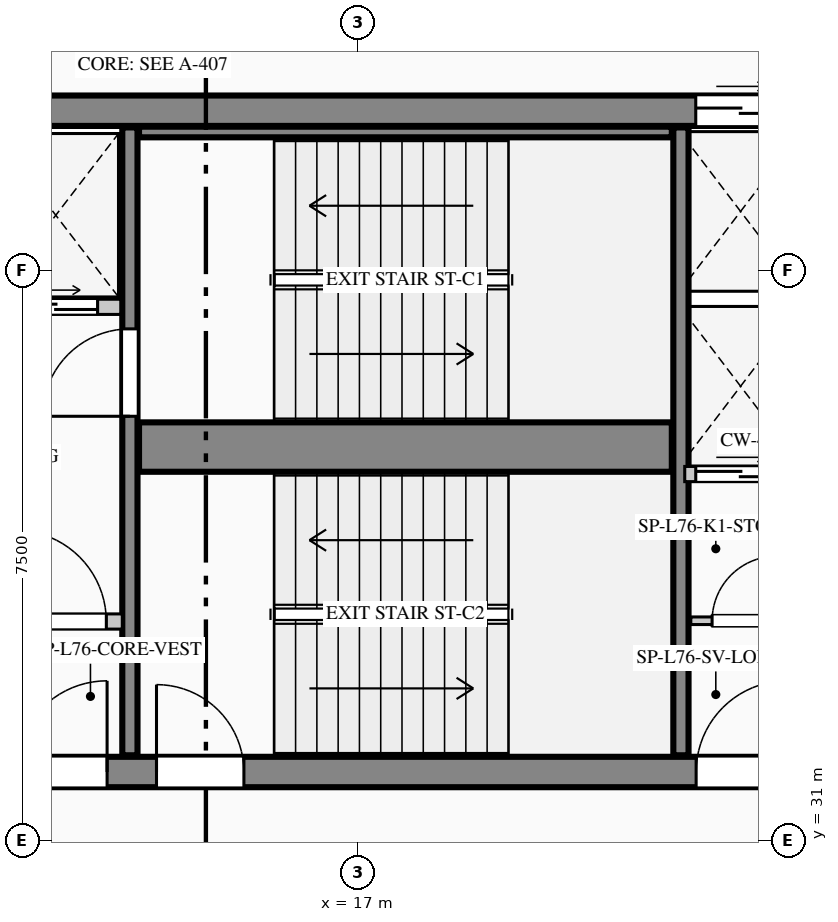
"""IFC4 building model, lengths in metres.
Left out: names, types, materials, properties, quantities, classifications, styles, units other than length and angle.
Written with IfcOpenShell. Run it as: python <this file> out.ifc"""

import sys

from ifc_helpers import new_model, si_unit, direction, frame, frame_2d, origin, place, context, subcontext, project, spatial, rectangle, extrude, element, fill, save


model = new_model("IFC4")
c1 = context("Model", 3, precision=1e-05, world=origin(), true_north=direction((0.0, 1.0)))
c2 = subcontext(c1, "Body", "Model", "MODEL_VIEW")
j1 = project(units=[si_unit("LENGTHUNIT", "METRE"), si_unit("PLANEANGLEUNIT", "RADIAN")], contexts=[c1])
p1 = place(None, origin())
s1 = spatial("IfcSite", under=j1, at=p1, CompositionType="ELEMENT")
p2 = place(p1, origin())
s2 = spatial("IfcBuilding", under=s1, at=p2, CompositionType="ELEMENT")
p3 = place(p2, frame((0.0, 0.0, 315.95)))
s3 = spatial("IfcBuildingStorey", under=s2, at=p3, CompositionType="ELEMENT", Elevation=315.95)
p4 = place(p3, frame((5.6, 40.6, 0.0), z_axis=(0.0, 0.0, 1.0), x_axis=(1.0, 0.0, 0.0)))
e1 = element("IfcWall", 1, at=p4, inside=s3, PredefinedType="SHEAR", context=c2, shape_type="SweptSolid", body=[
    extrude(rectangle(XDim=17.65, YDim=0.4, at=frame_2d((8.825, 0.0))), origin(), (0.0, 0.0, 1.0), 3.95),
])
p5 = place(p4, frame((15.845, 0.0, 0.0)))
e2 = element("IfcOpeningElement", 2, at=p5, cuts=e1, PredefinedType="OPENING", context=c2, shape_type="SweptSolid", body=[
    extrude(rectangle(XDim=1.18, YDim=2.25, at=frame_2d((0.59, 1.125))), frame((0.0, 0.21, 0.0), z_axis=(0.0, -1.0, 0.0), x_axis=(1.0, 0.0, 0.0)), (0.0, 0.0, 1.0), 0.42),
])
p6 = place(p3, frame((5.6, 31.9, 0.0), z_axis=(0.0, 0.0, 1.0), x_axis=(1.0, 0.0, 0.0)))
e3 = element("IfcWall", 3, at=p6, inside=s3, PredefinedType="SHEAR", context=c2, shape_type="SweptSolid", body=[
    extrude(rectangle(XDim=17.65, YDim=0.4, at=frame_2d((8.825, 0.0))), origin(), (0.0, 0.0, 1.0), 3.95),
])
p7 = place(p6, frame((3.05, 0.0, 0.0)))
e4 = element("IfcOpeningElement", 4, at=p7, cuts=e3, PredefinedType="OPENING", context=c2, shape_type="SweptSolid", body=[
    extrude(rectangle(XDim=1.2, YDim=2.2, at=frame_2d((0.6, 1.1))), frame((0.0, 0.21, 0.0), z_axis=(0.0, -1.0, 0.0), x_axis=(1.0, 0.0, 0.0)), (0.0, 0.0, 1.0), 0.42),
])
p8 = place(p6, frame((6.9, 0.0, 0.0)))
e5 = element("IfcOpeningElement", 5, at=p8, cuts=e3, PredefinedType="OPENING", context=c2, shape_type="SweptSolid", body=[
    extrude(rectangle(XDim=1.2, YDim=2.2, at=frame_2d((0.6, 1.1))), frame((0.0, 0.21, 0.0), z_axis=(0.0, -1.0, 0.0), x_axis=(1.0, 0.0, 0.0)), (0.0, 0.0, 1.0), 0.42),
])
p9 = place(p6, frame((8.75, 0.0, 0.0)))
e6 = element("IfcOpeningElement", 6, at=p9, cuts=e3, PredefinedType="OPENING", context=c2, shape_type="SweptSolid", body=[
    extrude(rectangle(XDim=1.15, YDim=2.2, at=frame_2d((0.575, 1.1))), frame((0.0, 0.21, 0.0), z_axis=(0.0, -1.0, 0.0), x_axis=(1.0, 0.0, 0.0)), (0.0, 0.0, 1.0), 0.42),
])
p10 = place(p6, frame((15.85, 0.0, 0.0)))
e7 = element("IfcOpeningElement", 7, at=p10, cuts=e3, PredefinedType="OPENING", context=c2, shape_type="SweptSolid", body=[
    extrude(rectangle(XDim=1.2, YDim=2.2, at=frame_2d((0.6, 1.1))), frame((0.0, 0.21, 0.0), z_axis=(0.0, -1.0, 0.0), x_axis=(1.0, 0.0, 0.0)), (0.0, 0.0, 1.0), 0.42),
])
p11 = place(p3, frame((14.0, 32.12, 0.0), z_axis=(0.0, 0.0, 1.0), x_axis=(0.0, 1.0, 0.0)))
e8 = element("IfcWall", 8, at=p11, inside=s3, PredefinedType="SHEAR", context=c2, shape_type="SweptSolid", body=[
    extrude(rectangle(XDim=8.26, YDim=0.2, at=frame_2d((4.13, 0.0))), origin(), (0.0, 0.0, 1.0), 3.95),
])
p12 = place(p11, frame((4.46, 0.0, 0.0)))
e9 = element("IfcOpeningElement", 9, at=p12, cuts=e8, PredefinedType="OPENING", context=c2, shape_type="SweptSolid", body=[
    extrude(rectangle(XDim=1.15, YDim=2.2, at=frame_2d((0.575, 1.1))), frame((0.0, 0.11, 0.0), z_axis=(0.0, -1.0, 0.0), x_axis=(1.0, 0.0, 0.0)), (0.0, 0.0, 1.0), 0.22),
])
p13 = place(p3, frame((14.12, 36.175, 0.0), z_axis=(0.0, 0.0, 1.0), x_axis=(1.0, 0.0, 0.0)))
e10 = element("IfcWall", 10, at=p13, inside=s3, PredefinedType="SHEAR", context=c2, shape_type="SweptSolid", body=[
    extrude(rectangle(XDim=7.01, YDim=0.65, at=frame_2d((3.505, 0.0))), origin(), (0.0, 0.0, 1.0), 3.95),
])
p14 = place(p3, frame((21.25, 32.12, 0.0), z_axis=(0.0, 0.0, 1.0), x_axis=(0.0, 1.0, 0.0)))
e11 = element("IfcWall", 11, at=p14, inside=s3, PredefinedType="SHEAR", context=c2, shape_type="SweptSolid", body=[
    extrude(rectangle(XDim=8.26, YDim=0.2, at=frame_2d((4.13, 0.0))), origin(), (0.0, 0.0, 1.0), 3.95),
])
p15 = place(p3, frame((14.12, 40.32, 0.0), z_axis=(0.0, 0.0, 1.0), x_axis=(1.0, 0.0, 0.0)))
e12 = element("IfcWall", 12, at=p15, inside=s3, PredefinedType="SHEAR", context=c2, shape_type="SweptSolid", body=[
    extrude(rectangle(XDim=7.01, YDim=0.14, at=frame_2d((3.505, 0.0))), origin(), (0.0, 0.0, 1.0), 3.95),
])
p16 = place(p3, frame((10.34, 38.02, 0.0), z_axis=(0.0, 0.0, 1.0), x_axis=(1.0, 0.0, 0.0)))
e13 = element("IfcWall", 13, at=p16, inside=s3, PredefinedType="PARTITIONING", context=c2, shape_type="SweptSolid", body=[
    extrude(rectangle(XDim=3.54, YDim=0.2, at=frame_2d((1.77, 0.0))), origin(), (0.0, 0.0, 1.0), 3.7),
])
p17 = place(p16, frame((0.285, 0.0, 0.0)))
e14 = element("IfcOpeningElement", 14, at=p17, cuts=e13, PredefinedType="OPENING", context=c2, shape_type="SweptSolid", body=[
    extrude(rectangle(XDim=1.1, YDim=2.2, at=frame_2d((0.55, 1.1))), frame((0.0, 0.11, 0.0), z_axis=(0.0, -1.0, 0.0), x_axis=(1.0, 0.0, 0.0)), (0.0, 0.0, 1.0), 0.22),
])
p18 = place(p16, frame((2.135, 0.0, 0.0)))
e15 = element("IfcOpeningElement", 15, at=p18, cuts=e13, PredefinedType="OPENING", context=c2, shape_type="SweptSolid", body=[
    extrude(rectangle(XDim=1.1, YDim=2.2, at=frame_2d((0.55, 1.1))), frame((0.0, 0.11, 0.0), z_axis=(0.0, -1.0, 0.0), x_axis=(1.0, 0.0, 0.0)), (0.0, 0.0, 1.0), 0.22),
])
p19 = place(p3, frame((10.34, 33.88, 0.0), z_axis=(0.0, 0.0, 1.0), x_axis=(1.0, 0.0, 0.0)))
e16 = element("IfcWall", 16, at=p19, inside=s3, PredefinedType="PARTITIONING", context=c2, shape_type="SweptSolid", body=[
    extrude(rectangle(XDim=3.56, YDim=0.2, at=frame_2d((1.78, 0.0))), origin(), (0.0, 0.0, 1.0), 3.7),
])
p20 = place(p19, frame((2.15, 0.0, 0.0)))
e17 = element("IfcOpeningElement", 17, at=p20, cuts=e16, PredefinedType="OPENING", context=c2, shape_type="SweptSolid", body=[
    extrude(rectangle(XDim=1.2, YDim=2.2, at=frame_2d((0.6, 1.1))), frame((0.0, 0.11, 0.0), z_axis=(0.0, -1.0, 0.0), x_axis=(1.0, 0.0, 0.0)), (0.0, 0.0, 1.0), 0.22),
])
p21 = place(p3, frame((21.38, 33.89, 0.0), z_axis=(0.0, 0.0, 1.0), x_axis=(1.0, 0.0, 0.0)))
e18 = element("IfcWall", 18, at=p21, inside=s3, PredefinedType="PARTITIONING", context=c2, shape_type="SweptSolid", body=[
    extrude(rectangle(XDim=1.42, YDim=0.1, at=frame_2d((0.71, 0.0))), origin(), (0.0, 0.0, 1.0), 3.7),
])
p22 = place(p21, frame((0.28, 0.0, 0.0)))
e19 = element("IfcOpeningElement", 19, at=p22, cuts=e18, PredefinedType="OPENING", context=c2, shape_type="SweptSolid", body=[
    extrude(rectangle(XDim=0.85, YDim=2.1, at=frame_2d((0.425, 1.05))), frame((0.0, 0.06, 0.0), z_axis=(0.0, -1.0, 0.0), x_axis=(1.0, 0.0, 0.0)), (0.0, 0.0, 1.0), 0.12),
])
p23 = place(p3, frame((21.3, 35.82, 0.0), z_axis=(0.0, 0.0, 1.0), x_axis=(1.0, 0.0, 0.0)))
e20 = element("IfcWall", 20, at=p23, inside=s3, PredefinedType="PARTITIONING", context=c2, shape_type="SweptSolid", body=[
    extrude(rectangle(XDim=1.5, YDim=0.2, at=frame_2d((0.75, 0.0))), origin(), (0.0, 0.0, 1.0), 3.7),
])
p24 = place(p23, frame((0.145, 0.0, 0.0)))
e21 = element("IfcOpeningElement", 21, at=p24, cuts=e20, PredefinedType="OPENING", context=c2, shape_type="SweptSolid", body=[
    extrude(rectangle(XDim=1.18, YDim=2.25, at=frame_2d((0.59, 1.125))), frame((0.0, 0.11, 0.0), z_axis=(0.0, -1.0, 0.0), x_axis=(1.0, 0.0, 0.0)), (0.0, 0.0, 1.0), 0.22),
])
p25 = place(p8, origin())
e22 = element("IfcDoor", 22, at=p25, inside=s3, OperationType="SINGLE_SWING_RIGHT", PredefinedType="DOOR", context=c2, shape_type="SweptSolid", body=[
    extrude(rectangle(XDim=1.2, YDim=2.2, at=frame_2d((0.6, 1.1))), frame((0.0, 0.025, 0.0), z_axis=(0.0, -1.0, 0.0), x_axis=(1.0, 0.0, 0.0)), (0.0, 0.0, 1.0), 0.05),
])
fill(e5, e22)
p26 = place(p9, origin())
e23 = element("IfcDoor", 23, at=p26, inside=s3, OperationType="SINGLE_SWING_LEFT", PredefinedType="DOOR", context=c2, shape_type="SweptSolid", body=[
    extrude(rectangle(XDim=1.15, YDim=2.2, at=frame_2d((0.575, 1.1))), frame((0.0, 0.025, 0.0), z_axis=(0.0, -1.0, 0.0), x_axis=(1.0, 0.0, 0.0)), (0.0, 0.0, 1.0), 0.05),
])
fill(e6, e23)
p27 = place(p10, origin())
e24 = element("IfcDoor", 24, at=p27, inside=s3, OperationType="SINGLE_SWING_RIGHT", PredefinedType="DOOR", context=c2, shape_type="SweptSolid", body=[
    extrude(rectangle(XDim=1.2, YDim=2.2, at=frame_2d((0.6, 1.1))), frame((0.0, 0.025, 0.0), z_axis=(0.0, -1.0, 0.0), x_axis=(1.0, 0.0, 0.0)), (0.0, 0.0, 1.0), 0.05),
])
fill(e7, e24)
p28 = place(p20, origin())
e25 = element("IfcDoor", 25, at=p28, inside=s3, OperationType="SINGLE_SWING_LEFT", PredefinedType="DOOR", context=c2, shape_type="SweptSolid", body=[
    extrude(rectangle(XDim=1.2, YDim=2.2, at=frame_2d((0.6, 1.1))), frame((0.0, 0.025, 0.0), z_axis=(0.0, -1.0, 0.0), x_axis=(1.0, 0.0, 0.0)), (0.0, 0.0, 1.0), 0.05),
])
fill(e17, e25)
p29 = place(p22, origin())
e26 = element("IfcDoor", 26, at=p29, inside=s3, OperationType="SINGLE_SWING_RIGHT", PredefinedType="DOOR", context=c2, shape_type="SweptSolid", body=[
    extrude(rectangle(XDim=0.85, YDim=2.1, at=frame_2d((0.425, 1.05))), frame((0.0, 0.025, 0.0), z_axis=(0.0, -1.0, 0.0), x_axis=(1.0, 0.0, 0.0)), (0.0, 0.0, 1.0), 0.05),
])
fill(e19, e26)
p30 = place(p12, origin())
e27 = element("IfcDoor", 27, at=p30, inside=s3, OperationType="SINGLE_SWING_LEFT", PredefinedType="DOOR", context=c2, shape_type="SweptSolid", body=[
    extrude(rectangle(XDim=1.15, YDim=2.2, at=frame_2d((0.575, 1.1))), frame((0.0, 0.025, 0.0), z_axis=(0.0, -1.0, 0.0), x_axis=(1.0, 0.0, 0.0)), (0.0, 0.0, 1.0), 0.05),
])
fill(e9, e27)
p31 = place(p18, origin())
e28 = element("IfcDoor", 28, at=p31, inside=s3, OperationType="DOUBLE_DOOR_SLIDING", PredefinedType="DOOR", context=c2, shape_type="SweptSolid", body=[
    extrude(rectangle(XDim=1.1, YDim=2.2, at=frame_2d((0.55, 1.1))), frame((0.0, 0.025, 0.0), z_axis=(0.0, -1.0, 0.0), x_axis=(1.0, 0.0, 0.0)), (0.0, 0.0, 1.0), 0.05),
])
fill(e15, e28)
p32 = place(p5, origin())
e29 = element("IfcDoor", 29, at=p32, inside=s3, OperationType="DOUBLE_DOOR_SLIDING", PredefinedType="DOOR", context=c2, shape_type="SweptSolid", body=[
    extrude(rectangle(XDim=1.18, YDim=2.25, at=frame_2d((0.59, 1.125))), frame((0.0, 0.025, 0.0), z_axis=(0.0, -1.0, 0.0), x_axis=(1.0, 0.0, 0.0)), (0.0, 0.0, 1.0), 0.05),
])
fill(e2, e29)
p33 = place(p24, origin())
e30 = element("IfcDoor", 30, at=p33, inside=s3, OperationType="DOUBLE_DOOR_SLIDING", PredefinedType="DOOR", context=c2, shape_type="SweptSolid", body=[
    extrude(rectangle(XDim=1.18, YDim=2.25, at=frame_2d((0.59, 1.125))), frame((0.0, 0.025, 0.0), z_axis=(0.0, -1.0, 0.0), x_axis=(1.0, 0.0, 0.0)), (0.0, 0.0, 1.0), 0.05),
])
fill(e21, e30)
save(model, sys.argv[1])
